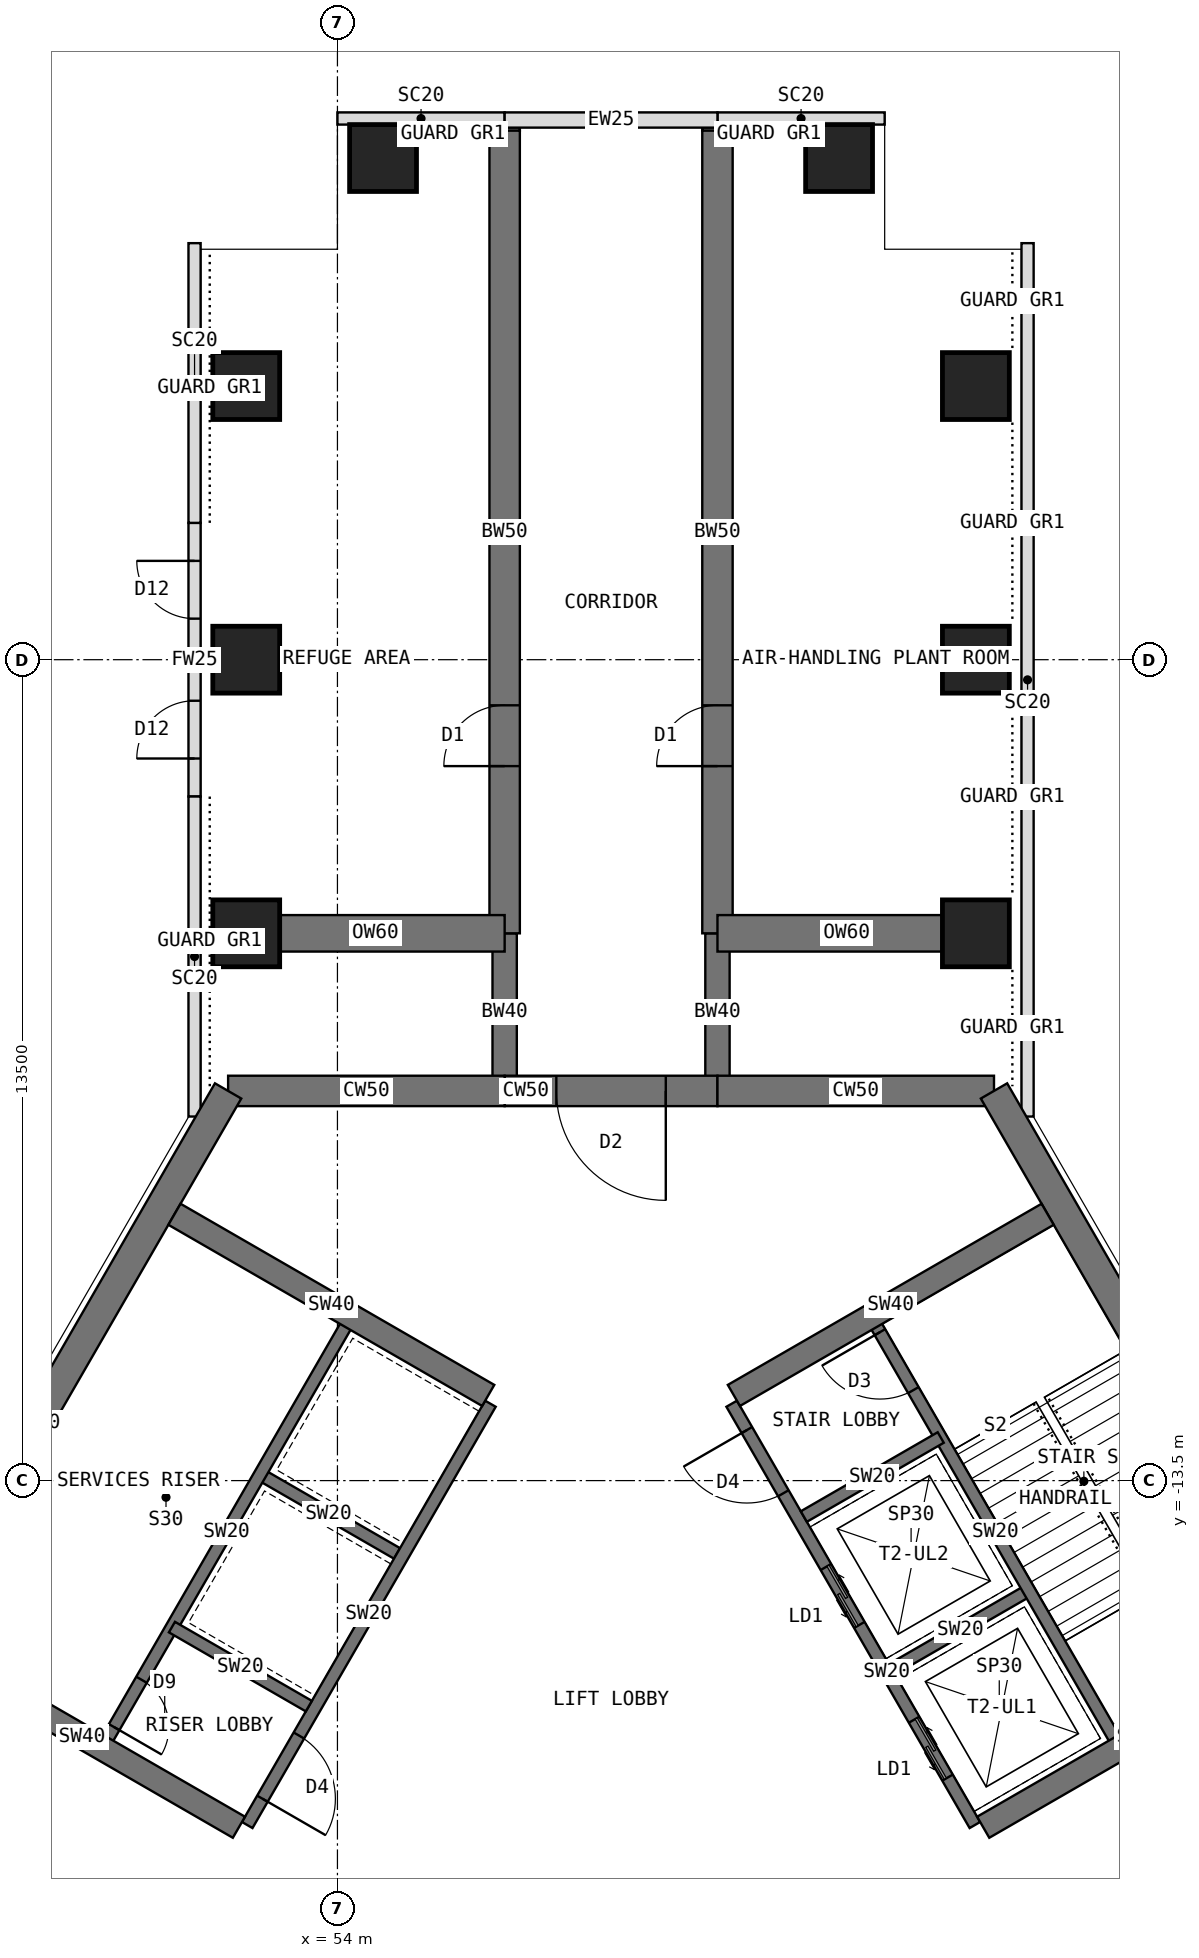
"""IFC4 building model, lengths in metres.
Left out: names, types, materials, properties, quantities, classifications, styles, units other than length and angle.
Written with IfcOpenShell. Run it as: python <this file> out.ifc"""

import sys

from ifc_helpers import new_model, si_unit, direction, frame, frame_2d, origin, origin_2d, place, context, subcontext, project, spatial, rectangle, extrude, element, fill, save


model = new_model("IFC4")
c1 = context("Model", 3, precision=1e-05, world=origin(), true_north=direction((0.0, 1.0)))
c2 = subcontext(c1, "Body", "Model", "MODEL_VIEW")
j1 = project(units=[si_unit("LENGTHUNIT", "METRE"), si_unit("PLANEANGLEUNIT", "RADIAN")], contexts=[c1])
p1 = place(None, origin())
s1 = spatial("IfcSite", under=j1, at=p1, CompositionType="ELEMENT")
p2 = place(p1, origin())
s2 = spatial("IfcBuilding", under=s1, at=p2, CompositionType="ELEMENT")
p3 = place(p2, frame((0.0, 0.0, 238.5)))
s3 = spatial("IfcBuildingStorey", under=s2, at=p3, CompositionType="ELEMENT", Elevation=238.5)
p4 = place(p3, frame((64.798, -7.092, 0.0), z_axis=(0.0, 0.0, 1.0), x_axis=(-1.0, 0.0, 0.0)))
e1 = element("IfcWall", 1, at=p4, inside=s3, PredefinedType="SHEAR", context=c2, shape_type="SweptSolid", body=[
    extrude(rectangle(XDim=4.548, YDim=0.5, at=frame_2d((2.274, 0.0))), origin(), (0.0, 0.0, 1.0), 5.0),
])
p5 = place(p3, frame((60.25, -7.092, 0.0), z_axis=(0.0, 0.0, 1.0), x_axis=(-1.0, 0.0, 0.0)))
e2 = element("IfcWall", 2, at=p5, inside=s3, PredefinedType="SHEAR", context=c2, shape_type="SweptSolid", body=[
    extrude(rectangle(XDim=3.5, YDim=0.5, at=frame_2d((1.75, 0.0))), origin(), (0.0, 0.0, 1.0), 5.0),
])
p6 = place(p5, frame((0.85, 0.0, 0.0)))
e3 = element("IfcOpeningElement", 3, at=p6, cuts=e2, PredefinedType="OPENING", context=c2, shape_type="SweptSolid", body=[
    extrude(rectangle(XDim=1.8, YDim=2.1, at=frame_2d((0.9, 1.05))), frame((0.0, 0.26, 0.0), z_axis=(0.0, -1.0, 0.0), x_axis=(1.0, 0.0, 0.0)), (0.0, 0.0, 1.0), 0.52),
])
p7 = place(p3, frame((56.75, -7.092, 0.0), z_axis=(0.0, 0.0, 1.0), x_axis=(-1.0, 0.0, 0.0)))
e4 = element("IfcWall", 4, at=p7, inside=s3, PredefinedType="SHEAR", context=c2, shape_type="SweptSolid", body=[
    extrude(rectangle(XDim=4.548, YDim=0.5, at=frame_2d((2.274, 0.0))), origin(), (0.0, 0.0, 1.0), 5.0),
])
for number, where, z_axis, x_axis in (
    (5, (52.202, -7.092, 0.0), (0.0, 0.0, 1.0), (-0.5, -0.866, 0.0)),
    (6, (71.096, -18.0, 0.0), (0.0, 0.0, 1.0), (-0.5, 0.866, 0.0)),
):
    element("IfcWall", number, at=place(p3, frame(where, z_axis=z_axis, x_axis=x_axis)), inside=s3, PredefinedType="SHEAR", context=c2, shape_type="SweptSolid", body=[
        extrude(rectangle(XDim=12.596, YDim=0.5, at=frame_2d((6.298, 0.0))), origin(), (0.0, 0.0, 1.0), 5.0),
    ])
p8 = place(p3, frame((56.75, -7.092, 0.0), z_axis=(0.0, 0.0, 1.0), x_axis=(0.0, 1.0, 0.0)))
e7 = element("IfcWall", 7, at=p8, inside=s3, PredefinedType="SHEAR", context=c2, shape_type="SweptSolid", body=[
    extrude(rectangle(XDim=2.592, YDim=0.4, at=frame_2d((1.296, 0.0))), origin(), (0.0, 0.0, 1.0), 5.0),
])
p9 = place(p3, frame((56.75, -4.5, 0.0), z_axis=(0.0, 0.0, 1.0), x_axis=(0.0, 1.0, 0.0)))
e8 = element("IfcWall", 8, at=p9, inside=s3, PredefinedType="SHEAR", context=c2, shape_type="SweptSolid", body=[
    extrude(rectangle(XDim=13.2, YDim=0.5, at=frame_2d((6.6, 0.0))), origin(), (0.0, 0.0, 1.0), 5.0),
])
p10 = place(p9, frame((2.75, 0.0, 0.0)))
e9 = element("IfcOpeningElement", 9, at=p10, cuts=e8, PredefinedType="OPENING", context=c2, shape_type="SweptSolid", body=[
    extrude(rectangle(XDim=1.0, YDim=2.1, at=frame_2d((0.5, 1.05))), frame((0.0, 0.26, 0.0), z_axis=(0.0, -1.0, 0.0), x_axis=(1.0, 0.0, 0.0)), (0.0, 0.0, 1.0), 0.52),
])
p11 = place(p3, frame((60.25, -7.092, 0.0), z_axis=(0.0, 0.0, 1.0), x_axis=(0.0, 1.0, 0.0)))
e10 = element("IfcWall", 10, at=p11, inside=s3, PredefinedType="SHEAR", context=c2, shape_type="SweptSolid", body=[
    extrude(rectangle(XDim=2.592, YDim=0.4, at=frame_2d((1.296, 0.0))), origin(), (0.0, 0.0, 1.0), 5.0),
])
p12 = place(p3, frame((60.25, -4.5, 0.0), z_axis=(0.0, 0.0, 1.0), x_axis=(0.0, 1.0, 0.0)))
e11 = element("IfcWall", 11, at=p12, inside=s3, PredefinedType="SHEAR", context=c2, shape_type="SweptSolid", body=[
    extrude(rectangle(XDim=13.2, YDim=0.5, at=frame_2d((6.6, 0.0))), origin(), (0.0, 0.0, 1.0), 5.0),
])
p13 = place(p12, frame((2.75, 0.0, 0.0)))
e12 = element("IfcOpeningElement", 12, at=p13, cuts=e11, PredefinedType="OPENING", context=c2, shape_type="SweptSolid", body=[
    extrude(rectangle(XDim=1.0, YDim=2.1, at=frame_2d((0.5, 1.05))), frame((0.0, 0.26, 0.0), z_axis=(0.0, -1.0, 0.0), x_axis=(1.0, 0.0, 0.0)), (0.0, 0.0, 1.0), 0.52),
])
for number, where, z_axis, x_axis in (
    (13, (52.5, -4.5, 0.0), (0.0, 0.0, 1.0), (1.0, 0.0, 0.0)),
    (14, (64.5, -4.5, 0.0), (0.0, 0.0, 1.0), (1.0, 0.0, 0.0)),
    (15, (52.5, 0.0, 0.0), (0.0, 0.0, 1.0), (1.0, 0.0, 0.0)),
    (16, (64.5, 0.0, 0.0), (0.0, 0.0, 1.0), (1.0, 0.0, 0.0)),
    (17, (52.5, 4.5, 0.0), (0.0, 0.0, 1.0), (1.0, 0.0, 0.0)),
    (18, (64.5, 4.5, 0.0), (0.0, 0.0, 1.0), (1.0, 0.0, 0.0)),
    (19, (54.75, 8.25, 0.0), (0.0, 0.0, 1.0), (1.0, 0.0, 0.0)),
    (20, (62.25, 8.25, 0.0), (0.0, 0.0, 1.0), (1.0, 0.0, 0.0)),
):
    element("IfcColumn", number, at=place(p3, frame(where, z_axis=z_axis, x_axis=x_axis)), inside=s3, PredefinedType="COLUMN", context=c2, shape_type="SweptSolid", body=[
        extrude(rectangle(XDim=1.1, YDim=1.1, at=origin_2d()), origin(), (0.0, 0.0, 1.0), 5.0),
    ])
for number, where, z_axis, x_axis in (
    (21, (56.75, -4.5, 0.0), (0.0, 0.0, 1.0), (-1.0, 0.0, 0.0)),
    (22, (60.25, -4.5, 0.0), (0.0, 0.0, 1.0), (1.0, 0.0, 0.0)),
):
    element("IfcWall", number, at=place(p3, frame(where, z_axis=z_axis, x_axis=x_axis)), inside=s3, PredefinedType="SHEAR", context=c2, shape_type="SweptSolid", body=[
        extrude(rectangle(XDim=4.25, YDim=0.6, at=frame_2d((2.125, 0.0))), origin(), (0.0, 0.0, 1.0), 5.0),
    ])
p14 = place(p3, frame((51.65, -7.513, 0.0), z_axis=(0.0, 0.0, 1.0), x_axis=(0.0, 1.0, 0.0)))
e23 = element("IfcWall", 23, at=p14, inside=s3, PredefinedType="USERDEFINED", context=c2, shape_type="SweptSolid", body=[
    extrude(rectangle(XDim=5.263, YDim=0.2, at=frame_2d((2.631, 0.0))), origin(), (0.0, 0.0, 1.0), 4.8),
])
p15 = place(p3, frame((51.65, -2.25, 0.0), z_axis=(0.0, 0.0, 1.0), x_axis=(0.0, 1.0, 0.0)))
e24 = element("IfcWall", 24, at=p15, inside=s3, PredefinedType="STANDARD", context=c2, shape_type="SweptSolid", body=[
    extrude(rectangle(XDim=4.5, YDim=0.2, at=frame_2d((2.25, 0.0))), origin(), (0.0, 0.0, 1.0), 4.8),
])
p16 = place(p15, frame((0.625, 0.0, 0.0)))
e25 = element("IfcOpeningElement", 25, at=p16, cuts=e24, PredefinedType="OPENING", context=c2, shape_type="SweptSolid", body=[
    extrude(rectangle(XDim=0.95, YDim=2.4, at=frame_2d((0.475, 1.2))), frame((0.0, 0.11, 0.0), z_axis=(0.0, -1.0, 0.0), x_axis=(1.0, 0.0, 0.0)), (0.0, 0.0, 1.0), 0.22),
])
p17 = place(p15, frame((2.925, 0.0, 0.0)))
e26 = element("IfcOpeningElement", 26, at=p17, cuts=e24, PredefinedType="OPENING", context=c2, shape_type="SweptSolid", body=[
    extrude(rectangle(XDim=0.95, YDim=2.4, at=frame_2d((0.475, 1.2))), frame((0.0, 0.11, 0.0), z_axis=(0.0, -1.0, 0.0), x_axis=(1.0, 0.0, 0.0)), (0.0, 0.0, 1.0), 0.22),
])
p18 = place(p3, frame((51.65, 2.25, 0.0), z_axis=(0.0, 0.0, 1.0), x_axis=(0.0, 1.0, 0.0)))
e27 = element("IfcWall", 27, at=p18, inside=s3, PredefinedType="USERDEFINED", context=c2, shape_type="SweptSolid", body=[
    extrude(rectangle(XDim=4.6, YDim=0.2, at=frame_2d((2.3, 0.0))), origin(), (0.0, 0.0, 1.0), 4.8),
])
p19 = place(p3, frame((65.35, 6.85, 0.0), z_axis=(0.0, 0.0, 1.0), x_axis=(0.0, -1.0, 0.0)))
e28 = element("IfcWall", 28, at=p19, inside=s3, PredefinedType="USERDEFINED", context=c2, shape_type="SweptSolid", body=[
    extrude(rectangle(XDim=14.363, YDim=0.2, at=frame_2d((7.182, 0.0))), origin(), (0.0, 0.0, 1.0), 4.8),
])
p20 = place(p3, frame((63.0, 8.9, 0.0), z_axis=(0.0, 0.0, 1.0), x_axis=(-1.0, 0.0, 0.0)))
e29 = element("IfcWall", 29, at=p20, inside=s3, PredefinedType="USERDEFINED", context=c2, shape_type="SweptSolid", body=[
    extrude(rectangle(XDim=2.75, YDim=0.2, at=frame_2d((1.375, 0.0))), origin(), (0.0, 0.0, 1.0), 4.8),
])
p21 = place(p3, frame((60.25, 8.875, 0.0), z_axis=(0.0, 0.0, 1.0), x_axis=(-1.0, 0.0, 0.0)))
e30 = element("IfcWall", 30, at=p21, inside=s3, PredefinedType="STANDARD", context=c2, shape_type="SweptSolid", body=[
    extrude(rectangle(XDim=3.5, YDim=0.25, at=frame_2d((1.75, 0.0))), origin(), (0.0, 0.0, 1.0), 4.8),
])
p22 = place(p3, frame((56.75, 8.9, 0.0), z_axis=(0.0, 0.0, 1.0), x_axis=(-1.0, 0.0, 0.0)))
e31 = element("IfcWall", 31, at=p22, inside=s3, PredefinedType="USERDEFINED", context=c2, shape_type="SweptSolid", body=[
    extrude(rectangle(XDim=2.75, YDim=0.2, at=frame_2d((1.375, 0.0))), origin(), (0.0, 0.0, 1.0), 4.8),
])
for number, where, z_axis, x_axis in (
    (32, (56.75, 8.7, 0.0), (0.0, 0.0, 1.0), (0.0, 1.0, 0.0)),
    (33, (60.25, 8.7, 0.0), (0.0, 0.0, 1.0), (0.0, 1.0, 0.0)),
):
    element("IfcWall", number, at=place(p3, frame(where, z_axis=z_axis, x_axis=x_axis)), inside=s3, PredefinedType="PARTITIONING", context=c2, shape_type="SweptSolid", body=[
        extrude(rectangle(XDim=0.05, YDim=0.5, at=frame_2d((0.025, 0.0))), origin(), (0.0, 0.0, 1.0), 4.8),
    ])
p23 = place(p3, frame((56.516, -12.236, 0.0), z_axis=(0.0, 0.0, 1.0), x_axis=(-0.49999894854, -0.866026010844, 0.0)))
e34 = element("IfcWall", 34, at=p23, inside=s3, PredefinedType="SHEAR", context=c2, shape_type="SweptSolid", body=[
    extrude(rectangle(XDim=8.0, YDim=0.2, at=frame_2d((4.0, 0.0))), origin(), (0.0, 0.0, 1.0), 5.0),
])
p24 = place(p23, frame((6.3, 0.0, 0.0)))
e35 = element("IfcOpeningElement", 35, at=p24, cuts=e34, PredefinedType="OPENING", context=c2, shape_type="SweptSolid", body=[
    extrude(rectangle(XDim=1.2, YDim=2.1, at=frame_2d((0.6, 1.05))), frame((0.0, 0.11, 0.0), z_axis=(0.0, -1.0, 0.0), x_axis=(1.0, 0.0, 0.0)), (0.0, 0.0, 1.0), 0.22),
])
for number, where, z_axis, x_axis in (
    (36, (54.98, -14.697, 0.0), (0.0, 0.0, 1.0), (-0.866, 0.5, 0.0)),
    (37, (53.53, -17.209, 0.0), (0.0, 0.0, 1.0), (-0.866, 0.5, 0.0)),
):
    element("IfcWall", number, at=place(p3, frame(where, z_axis=z_axis, x_axis=x_axis)), inside=s3, PredefinedType="SHEAR", context=c2, shape_type="SweptSolid", body=[
        extrude(rectangle(XDim=2.6, YDim=0.2, at=frame_2d((1.3, 0.0))), origin(), (0.0, 0.0, 1.0), 5.0),
    ])
p25 = place(p3, frame((54.178, -10.886, 0.0), z_axis=(0.0, 0.0, 1.0), x_axis=(-0.49999894854, -0.866026010844, 0.0)))
e38 = element("IfcWall", 38, at=p25, inside=s3, PredefinedType="SHEAR", context=c2, shape_type="SweptSolid", body=[
    extrude(rectangle(XDim=8.0, YDim=0.2, at=frame_2d((4.0, 0.0))), origin(), (0.0, 0.0, 1.0), 5.0),
])
p26 = place(p25, frame((6.8, 0.0, 0.0)))
e39 = element("IfcOpeningElement", 39, at=p26, cuts=e38, PredefinedType="OPENING", context=c2, shape_type="SweptSolid", body=[
    extrude(rectangle(XDim=0.9, YDim=2.1, at=frame_2d((0.45, 1.05))), frame((0.0, 0.11, 0.0), z_axis=(0.0, -1.0, 0.0), x_axis=(1.0, 0.0, 0.0)), (0.0, 0.0, 1.0), 0.22),
])
p27 = place(p3, frame((52.38, -19.201, 0.0), z_axis=(0.0, 0.0, 1.0), x_axis=(-0.866012946976, 0.500021575205, 0.0)))
e40 = element("IfcWall", 40, at=p27, inside=s3, PredefinedType="SHEAR", context=c2, shape_type="SweptSolid", body=[
    extrude(rectangle(XDim=5.958, YDim=0.4, at=frame_2d((2.979, 0.0))), origin(), (0.0, 0.0, 1.0), 5.0),
])
p28 = place(p3, frame((56.48, -12.099, 0.0), z_axis=(0.0, 0.0, 1.0), x_axis=(-0.86602319114, 0.500003832394, 0.0)))
e41 = element("IfcWall", 41, at=p28, inside=s3, PredefinedType="SHEAR", context=c2, shape_type="SweptSolid", body=[
    extrude(rectangle(XDim=5.958, YDim=0.4, at=frame_2d((2.979, 0.0))), origin(), (0.0, 0.0, 1.0), 5.0),
])
p29 = place(p3, frame((64.484, -19.164, 0.0), z_axis=(0.0, 0.0, 1.0), x_axis=(-0.49999894854, 0.866026010844, 0.0)))
e42 = element("IfcWall", 42, at=p29, inside=s3, PredefinedType="SHEAR", context=c2, shape_type="SweptSolid", body=[
    extrude(rectangle(XDim=8.0, YDim=0.2, at=frame_2d((4.0, 0.0))), origin(), (0.0, 0.0, 1.0), 5.0),
])
p30 = place(p29, frame((6.3, 0.0, 0.0)))
e43 = element("IfcOpeningElement", 43, at=p30, cuts=e42, PredefinedType="OPENING", context=c2, shape_type="SweptSolid", body=[
    extrude(rectangle(XDim=1.2, YDim=2.1, at=frame_2d((0.6, 1.05))), frame((0.0, 0.11, 0.0), z_axis=(0.0, -1.0, 0.0), x_axis=(1.0, 0.0, 0.0)), (0.0, 0.0, 1.0), 0.22),
])
p31 = place(p29, frame((0.9, 0.0, 0.0)))
e44 = element("IfcOpeningElement", 44, at=p31, cuts=e42, PredefinedType="OPENING", context=c2, shape_type="SweptSolid", body=[
    extrude(rectangle(XDim=1.1, YDim=2.2, at=frame_2d((0.55, 1.1))), frame((0.0, 0.11, 0.0), z_axis=(0.0, -1.0, 0.0), x_axis=(1.0, 0.0, 0.0)), (0.0, 0.0, 1.0), 0.22),
])
p32 = place(p29, frame((3.8, 0.0, 0.0)))
e45 = element("IfcOpeningElement", 45, at=p32, cuts=e42, PredefinedType="OPENING", context=c2, shape_type="SweptSolid", body=[
    extrude(rectangle(XDim=1.1, YDim=2.2, at=frame_2d((0.55, 1.1))), frame((0.0, 0.11, 0.0), z_axis=(0.0, -1.0, 0.0), x_axis=(1.0, 0.0, 0.0)), (0.0, 0.0, 1.0), 0.22),
])
p33 = place(p3, frame((63.12, -16.603, 0.0), z_axis=(0.0, 0.0, 1.0), x_axis=(0.866062058628, 0.499936506574, 0.0)))
e46 = element("IfcWall", 46, at=p33, inside=s3, PredefinedType="SHEAR", context=c2, shape_type="SweptSolid", body=[
    extrude(rectangle(XDim=2.6, YDim=0.2, at=frame_2d((1.3, 0.0))), origin(), (0.0, 0.0, 1.0), 5.0),
])
p34 = place(p3, frame((61.67, -14.091, 0.0), z_axis=(0.0, 0.0, 1.0), x_axis=(0.86603858612, 0.49997716683, 0.0)))
e47 = element("IfcWall", 47, at=p34, inside=s3, PredefinedType="SHEAR", context=c2, shape_type="SweptSolid", body=[
    extrude(rectangle(XDim=2.6, YDim=0.2, at=frame_2d((1.3, 0.0))), origin(), (0.0, 0.0, 1.0), 5.0),
])
p35 = place(p3, frame((66.822, -17.814, 0.0), z_axis=(0.0, 0.0, 1.0), x_axis=(-0.49999894854, 0.866026010844, 0.0)))
e48 = element("IfcWall", 48, at=p35, inside=s3, PredefinedType="SHEAR", context=c2, shape_type="SweptSolid", body=[
    extrude(rectangle(XDim=8.0, YDim=0.2, at=frame_2d((4.0, 0.0))), origin(), (0.0, 0.0, 1.0), 5.0),
])
p36 = place(p35, frame((6.7, 0.0, 0.0)))
e49 = element("IfcOpeningElement", 49, at=p36, cuts=e48, PredefinedType="OPENING", context=c2, shape_type="SweptSolid", body=[
    extrude(rectangle(XDim=1.1, YDim=2.1, at=frame_2d((0.55, 1.05))), frame((0.0, 0.11, 0.0), z_axis=(0.0, -1.0, 0.0), x_axis=(1.0, 0.0, 0.0)), (0.0, 0.0, 1.0), 0.22),
])
p37 = place(p3, frame((60.52, -12.099, 0.0), z_axis=(0.0, 0.0, 1.0), x_axis=(0.86602319114, 0.500003832394, 0.0)))
e50 = element("IfcWall", 50, at=p37, inside=s3, PredefinedType="SHEAR", context=c2, shape_type="SweptSolid", body=[
    extrude(rectangle(XDim=5.958, YDim=0.4, at=frame_2d((2.979, 0.0))), origin(), (0.0, 0.0, 1.0), 5.0),
])
p38 = place(p3, frame((64.62, -19.201, 0.0), z_axis=(0.0, 0.0, 1.0), x_axis=(0.866012946976, 0.500021575205, 0.0)))
e51 = element("IfcWall", 51, at=p38, inside=s3, PredefinedType="SHEAR", context=c2, shape_type="SweptSolid", body=[
    extrude(rectangle(XDim=5.958, YDim=0.4, at=frame_2d((2.979, 0.0))), origin(), (0.0, 0.0, 1.0), 5.0),
])
p39 = place(p16, origin())
e52 = element("IfcDoor", 52, at=p39, inside=s3, OperationType="SINGLE_SWING_LEFT", PredefinedType="DOOR", context=c2, shape_type="SweptSolid", body=[
    extrude(rectangle(XDim=0.95, YDim=2.4, at=frame_2d((0.475, 1.2))), frame((0.0, 0.025, 0.0), z_axis=(0.0, -1.0, 0.0), x_axis=(1.0, 0.0, 0.0)), (0.0, 0.0, 1.0), 0.05),
])
fill(e25, e52)
p40 = place(p17, origin())
e53 = element("IfcDoor", 53, at=p40, inside=s3, OperationType="SINGLE_SWING_RIGHT", PredefinedType="DOOR", context=c2, shape_type="SweptSolid", body=[
    extrude(rectangle(XDim=0.95, YDim=2.4, at=frame_2d((0.475, 1.2))), frame((0.0, 0.025, 0.0), z_axis=(0.0, -1.0, 0.0), x_axis=(1.0, 0.0, 0.0)), (0.0, 0.0, 1.0), 0.05),
])
fill(e26, e53)
p41 = place(p24, origin())
e54 = element("IfcDoor", 54, at=p41, inside=s3, OperationType="SINGLE_SWING_RIGHT", PredefinedType="DOOR", context=c2, shape_type="SweptSolid", body=[
    extrude(rectangle(XDim=1.2, YDim=2.1, at=frame_2d((0.6, 1.05))), frame((0.0, 0.025, 0.0), z_axis=(0.0, -1.0, 0.0), x_axis=(1.0, 0.0, 0.0)), (0.0, 0.0, 1.0), 0.05),
])
fill(e35, e54)
p42 = place(p26, origin())
e55 = element("IfcDoor", 55, at=p42, inside=s3, OperationType="SINGLE_SWING_RIGHT", PredefinedType="DOOR", context=c2, shape_type="SweptSolid", body=[
    extrude(rectangle(XDim=0.9, YDim=2.1, at=frame_2d((0.45, 1.05))), frame((0.0, 0.025, 0.0), z_axis=(0.0, -1.0, 0.0), x_axis=(1.0, 0.0, 0.0)), (0.0, 0.0, 1.0), 0.05),
])
fill(e39, e55)
p43 = place(p30, origin())
e56 = element("IfcDoor", 56, at=p43, inside=s3, OperationType="SINGLE_SWING_RIGHT", PredefinedType="DOOR", context=c2, shape_type="SweptSolid", body=[
    extrude(rectangle(XDim=1.2, YDim=2.1, at=frame_2d((0.6, 1.05))), frame((0.0, 0.025, 0.0), z_axis=(0.0, -1.0, 0.0), x_axis=(1.0, 0.0, 0.0)), (0.0, 0.0, 1.0), 0.05),
])
fill(e43, e56)
p44 = place(p31, origin())
e57 = element("IfcDoor", 57, at=p44, inside=s3, OperationType="DOUBLE_DOOR_SLIDING", PredefinedType="DOOR", context=c2, shape_type="SweptSolid", body=[
    extrude(rectangle(XDim=1.1, YDim=2.2, at=frame_2d((0.55, 1.1))), frame((0.0, 0.025, 0.0), z_axis=(0.0, -1.0, 0.0), x_axis=(1.0, 0.0, 0.0)), (0.0, 0.0, 1.0), 0.05),
])
fill(e44, e57)
p45 = place(p32, origin())
e58 = element("IfcDoor", 58, at=p45, inside=s3, OperationType="DOUBLE_DOOR_SLIDING", PredefinedType="DOOR", context=c2, shape_type="SweptSolid", body=[
    extrude(rectangle(XDim=1.1, YDim=2.2, at=frame_2d((0.55, 1.1))), frame((0.0, 0.025, 0.0), z_axis=(0.0, -1.0, 0.0), x_axis=(1.0, 0.0, 0.0)), (0.0, 0.0, 1.0), 0.05),
])
fill(e45, e58)
p46 = place(p36, origin())
e59 = element("IfcDoor", 59, at=p46, inside=s3, OperationType="SINGLE_SWING_RIGHT", PredefinedType="DOOR", context=c2, shape_type="SweptSolid", body=[
    extrude(rectangle(XDim=1.1, YDim=2.1, at=frame_2d((0.55, 1.05))), frame((0.0, 0.025, 0.0), z_axis=(0.0, -1.0, 0.0), x_axis=(1.0, 0.0, 0.0)), (0.0, 0.0, 1.0), 0.05),
])
fill(e49, e59)
p47 = place(p6, origin())
e60 = element("IfcDoor", 60, at=p47, inside=s3, OperationType="DOUBLE_DOOR_DOUBLE_SWING", PredefinedType="DOOR", context=c2, shape_type="SweptSolid", body=[
    extrude(rectangle(XDim=1.8, YDim=2.1, at=frame_2d((0.9, 1.05))), frame((0.0, 0.025, 0.0), z_axis=(0.0, -1.0, 0.0), x_axis=(1.0, 0.0, 0.0)), (0.0, 0.0, 1.0), 0.05),
])
fill(e3, e60)
p48 = place(p10, origin())
e61 = element("IfcDoor", 61, at=p48, inside=s3, OperationType="SINGLE_SWING_LEFT", PredefinedType="DOOR", context=c2, shape_type="SweptSolid", body=[
    extrude(rectangle(XDim=1.0, YDim=2.1, at=frame_2d((0.5, 1.05))), frame((0.0, 0.025, 0.0), z_axis=(0.0, -1.0, 0.0), x_axis=(1.0, 0.0, 0.0)), (0.0, 0.0, 1.0), 0.05),
])
fill(e9, e61)
p49 = place(p13, origin())
e62 = element("IfcDoor", 62, at=p49, inside=s3, OperationType="SINGLE_SWING_LEFT", PredefinedType="DOOR", context=c2, shape_type="SweptSolid", body=[
    extrude(rectangle(XDim=1.0, YDim=2.1, at=frame_2d((0.5, 1.05))), frame((0.0, 0.025, 0.0), z_axis=(0.0, -1.0, 0.0), x_axis=(1.0, 0.0, 0.0)), (0.0, 0.0, 1.0), 0.05),
])
fill(e12, e62)
save(model, sys.argv[1])
